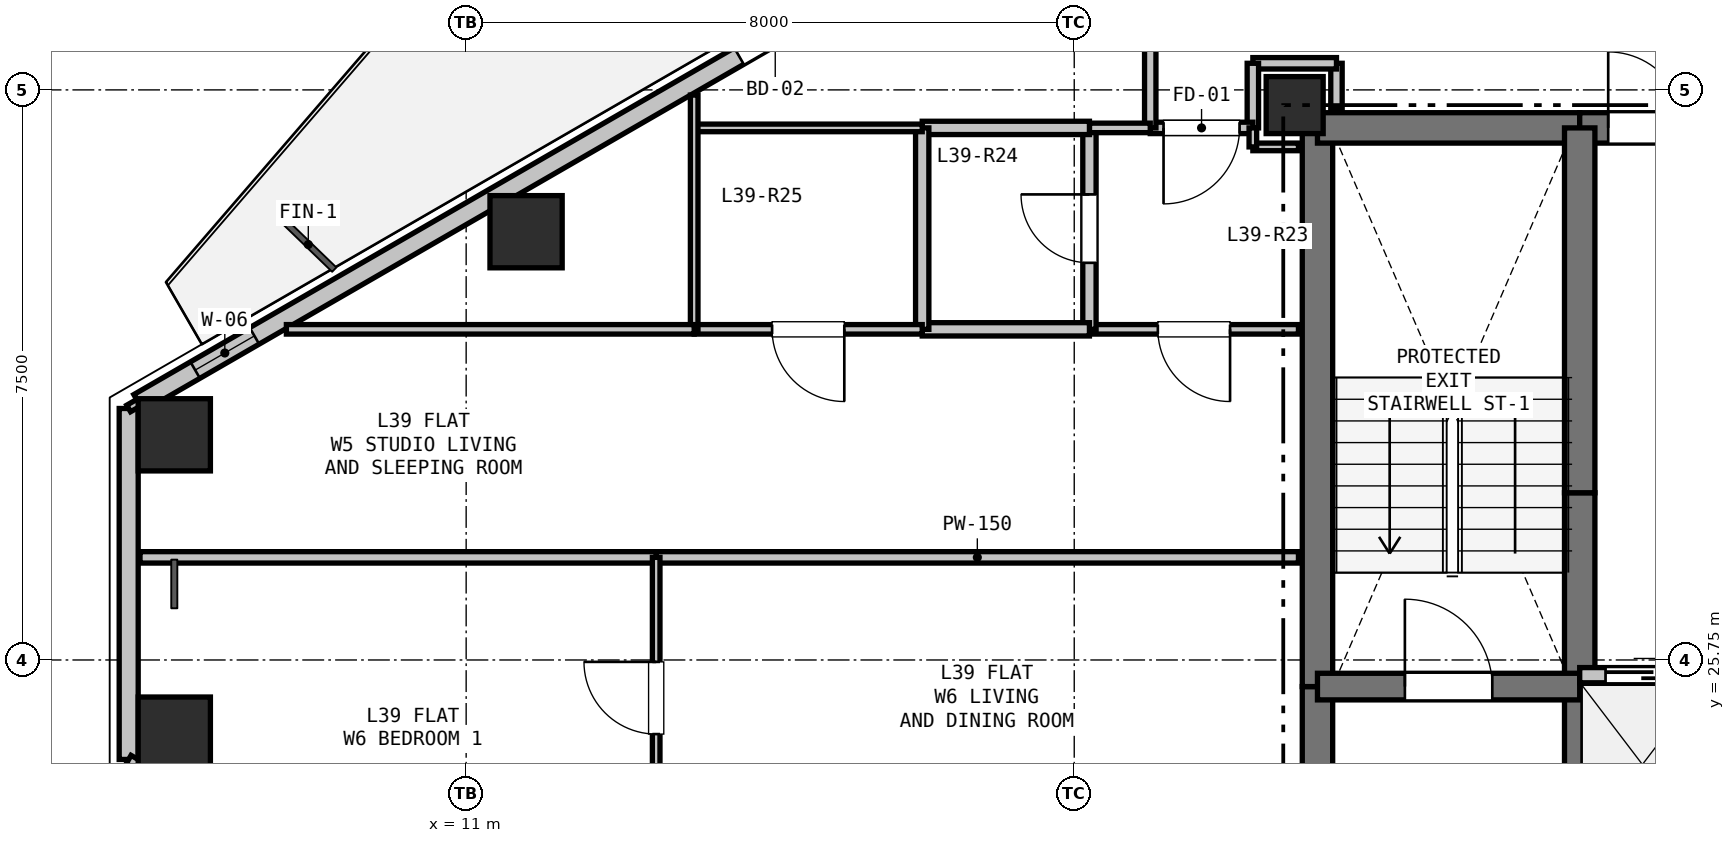
"""IFC4 building model, lengths in metres.
Left out: names, types, materials, properties, quantities, classifications, styles, units other than length and angle.
Written with IfcOpenShell. Run it as: python <this file> out.ifc"""

import sys

from ifc_helpers import new_model, si_unit, direction, frame, frame_2d, origin, origin_2d, place, context, subcontext, project, spatial, rectangle, hollow_rectangle, extrude, element, fill, save


model = new_model("IFC4")
c1 = context("Model", 3, precision=1e-05, world=origin(), true_north=direction((0.0, 1.0)))
c2 = subcontext(c1, "Body", "Model", "MODEL_VIEW")
j1 = project(units=[si_unit("LENGTHUNIT", "METRE"), si_unit("PLANEANGLEUNIT", "RADIAN")], contexts=[c1])
p1 = place(None, origin())
s1 = spatial("IfcSite", under=j1, at=p1, CompositionType="ELEMENT")
p2 = place(p1, origin())
s2 = spatial("IfcBuilding", under=s1, at=p2, CompositionType="ELEMENT")
p3 = place(p2, frame((0.0, 0.0, 141.0)))
s3 = spatial("IfcBuildingStorey", under=s2, at=p3, CompositionType="ELEMENT", Elevation=141.0)
p4 = place(p3, frame((21.9, 33.05, 0.0), z_axis=(0.0, 0.0, 1.0), x_axis=(1.0, 0.0, 0.0)))
e1 = element("IfcColumn", 1, at=p4, inside=s3, PredefinedType="COLUMN", context=c2, shape_type="SweptSolid", body=[
    extrude(rectangle(XDim=0.75, YDim=0.75, at=origin_2d()), origin(), (0.0, 0.0, 1.0), 3.3),
])
for number, where, z_axis, x_axis in (
    (2, (7.16, 28.712, 0.0), (0.0, 0.0, 1.0), (1.0, 0.0, 0.0)),
    (3, (11.788, 31.384, 0.0), (0.0, 0.0, 1.0), (1.0, 0.0, 0.0)),
    (4, (7.16, 24.788, 0.0), (0.0, 0.0, 1.0), (1.0, 0.0, 0.0)),
):
    element("IfcColumn", number, at=place(p3, frame(where, z_axis=z_axis, x_axis=x_axis)), inside=s3, PredefinedType="COLUMN", context=c2, shape_type="SweptSolid", body=[
        extrude(hollow_rectangle(XDim=0.95, YDim=0.95, WallThickness=0.028, at=origin_2d()), origin(), (0.0, 0.0, 1.0), 3.3),
    ])
p5 = place(p3, frame((6.56, 24.441, 0.0), z_axis=(0.0, 0.0, 1.0), x_axis=(0.0, 1.0, 0.0)))
e5 = element("IfcWall", 5, at=p5, inside=s3, PredefinedType="SOLIDWALL", context=c2, shape_type="SweptSolid", body=[
    extrude(rectangle(XDim=4.617, YDim=0.25, at=frame_2d((2.309, 0.0))), origin(), (0.0, 0.0, 1.0), 2.68),
])
p6 = place(p3, frame((6.69, 29.134, 0.0), z_axis=(0.0, 0.0, 1.0), x_axis=(0.866027848477, 0.499995765644, 0.0)))
e6 = element("IfcWall", 6, at=p6, inside=s3, PredefinedType="SOLIDWALL", context=c2, shape_type="SweptSolid", body=[
    extrude(rectangle(XDim=11.186, YDim=0.25, at=frame_2d((5.593, 0.0))), origin(), (0.0, 0.0, 1.0), 2.68),
])
p7 = place(p6, frame((9.122, 0.0, 0.0)))
e7 = element("IfcOpeningElement", 7, at=p7, cuts=e6, PredefinedType="OPENING", context=c2, shape_type="SweptSolid", body=[
    extrude(rectangle(XDim=1.1, YDim=2.1, at=frame_2d((0.55, 1.05))), frame((0.0, 0.135, 0.0), z_axis=(0.0, -1.0, 0.0), x_axis=(1.0, 0.0, 0.0)), (0.0, 0.0, 1.0), 0.27),
])
p8 = place(p6, frame((0.86, 0.0, 0.9)))
e8 = element("IfcOpeningElement", 8, at=p8, cuts=e6, PredefinedType="OPENING", context=c2, shape_type="SweptSolid", body=[
    extrude(rectangle(XDim=0.9, YDim=1.4, at=frame_2d((0.45, 0.7))), frame((0.0, 0.135, 0.0), z_axis=(0.0, -1.0, 0.0), x_axis=(1.0, 0.0, 0.0)), (0.0, 0.0, 1.0), 0.27),
])
p9 = place(p3, frame((16.378, 18.773, 0.0), z_axis=(0.0, 0.0, 1.0), x_axis=(-0.866027848477, 0.499995765644, 0.0)))
e9 = element("IfcWall", 9, at=p9, inside=s3, PredefinedType="SOLIDWALL", context=c2, shape_type="SweptSolid", body=[
    extrude(rectangle(XDim=11.186, YDim=0.25, at=frame_2d((5.593, 0.0))), origin(), (0.0, 0.0, 1.0), 2.68),
])
p10 = place(p9, frame((6.757, 0.0, 0.9)))
e10 = element("IfcOpeningElement", 10, at=p10, cuts=e9, PredefinedType="OPENING", context=c2, shape_type="SweptSolid", body=[
    extrude(rectangle(XDim=1.2, YDim=1.4, at=frame_2d((0.6, 0.7))), frame((0.0, 0.135, 0.0), z_axis=(0.0, -1.0, 0.0), x_axis=(1.0, 0.0, 0.0)), (0.0, 0.0, 1.0), 0.27),
])
p11 = place(p3, frame((22.2, 20.75, 0.0), z_axis=(0.0, 0.0, 1.0), x_axis=(0.0, 1.0, 0.0)))
e11 = element("IfcWall", 11, at=p11, inside=s3, PredefinedType="SHEAR", context=c2, shape_type="SweptSolid", body=[
    extrude(rectangle(XDim=4.65, YDim=0.4, at=frame_2d((2.325, 0.0))), origin(), (0.0, 0.0, 1.0), 3.06),
])
p12 = place(p3, frame((22.2, 25.4, 0.0), z_axis=(0.0, 0.0, 1.0), x_axis=(0.0, 1.0, 0.0)))
e12 = element("IfcWall", 12, at=p12, inside=s3, PredefinedType="SHEAR", context=c2, shape_type="SweptSolid", body=[
    extrude(rectangle(XDim=7.35, YDim=0.4, at=frame_2d((3.675, 0.0))), origin(), (0.0, 0.0, 1.0), 3.06),
])
p13 = place(p3, frame((22.2, 32.75, 0.0), z_axis=(0.0, 0.0, 1.0), x_axis=(1.0, 0.0, 0.0)))
e13 = element("IfcWall", 13, at=p13, inside=s3, PredefinedType="SHEAR", context=c2, shape_type="SweptSolid", body=[
    extrude(rectangle(XDim=3.45, YDim=0.4, at=frame_2d((1.725, 0.0))), origin(), (0.0, 0.0, 1.0), 3.06),
])
p14 = place(p3, frame((25.65, 32.75, 0.0), z_axis=(0.0, 0.0, 1.0), x_axis=(1.0, 0.0, 0.0)))
e14 = element("IfcWall", 14, at=p14, inside=s3, PredefinedType="SHEAR", context=c2, shape_type="SweptSolid", body=[
    extrude(rectangle(XDim=1.75, YDim=0.4, at=frame_2d((0.875, 0.0))), origin(), (0.0, 0.0, 1.0), 3.06),
])
p15 = place(p14, frame((0.375, 0.0, 0.0)))
e15 = element("IfcOpeningElement", 15, at=p15, cuts=e14, PredefinedType="OPENING", context=c2, shape_type="SweptSolid", body=[
    extrude(rectangle(XDim=1.0, YDim=2.15, at=frame_2d((0.5, 1.075))), frame((0.0, 0.21, 0.0), z_axis=(0.0, -1.0, 0.0), x_axis=(1.0, 0.0, 0.0)), (0.0, 0.0, 1.0), 0.42),
])
p16 = place(p3, frame((25.65, 22.75, 0.0), z_axis=(0.0, 0.0, 1.0), x_axis=(0.0, 1.0, 0.0)))
e16 = element("IfcWall", 16, at=p16, inside=s3, PredefinedType="SHEAR", context=c2, shape_type="SweptSolid", body=[
    extrude(rectangle(XDim=2.8, YDim=0.4, at=frame_2d((1.4, 0.0))), origin(), (0.0, 0.0, 1.0), 3.06),
])
p17 = place(p3, frame((25.65, 25.55, 0.0), z_axis=(0.0, 0.0, 1.0), x_axis=(0.0, 1.0, 0.0)))
e17 = element("IfcWall", 17, at=p17, inside=s3, PredefinedType="SHEAR", context=c2, shape_type="SweptSolid", body=[
    extrude(rectangle(XDim=2.4, YDim=0.4, at=frame_2d((1.2, 0.0))), origin(), (0.0, 0.0, 1.0), 3.06),
])
p18 = place(p3, frame((25.65, 27.95, 0.0), z_axis=(0.0, 0.0, 1.0), x_axis=(0.0, 1.0, 0.0)))
e18 = element("IfcWall", 18, at=p18, inside=s3, PredefinedType="SHEAR", context=c2, shape_type="SweptSolid", body=[
    extrude(rectangle(XDim=4.8, YDim=0.4, at=frame_2d((2.4, 0.0))), origin(), (0.0, 0.0, 1.0), 3.06),
])
p19 = place(p3, frame((22.2, 25.4, 0.0), z_axis=(0.0, 0.0, 1.0), x_axis=(1.0, 0.0, 0.0)))
e19 = element("IfcWall", 19, at=p19, inside=s3, PredefinedType="SHEAR", context=c2, shape_type="SweptSolid", body=[
    extrude(rectangle(XDim=3.45, YDim=0.35, at=frame_2d((1.725, 0.0))), origin(), (0.0, 0.0, 1.0), 3.06),
])
p20 = place(p19, frame((1.15, 0.0, 0.0)))
e20 = element("IfcOpeningElement", 20, at=p20, cuts=e19, PredefinedType="OPENING", context=c2, shape_type="SweptSolid", body=[
    extrude(rectangle(XDim=1.15, YDim=2.15, at=frame_2d((0.575, 1.075))), frame((0.0, 0.185, 0.0), z_axis=(0.0, -1.0, 0.0), x_axis=(1.0, 0.0, 0.0)), (0.0, 0.0, 1.0), 0.37),
])
p21 = place(p3, frame((25.65, 25.55, 0.0), z_axis=(0.0, 0.0, 1.0), x_axis=(1.0, 0.0, 0.0)))
e21 = element("IfcWall", 21, at=p21, inside=s3, PredefinedType="PARTITIONING", context=c2, shape_type="SweptSolid", body=[
    extrude(rectangle(XDim=4.95, YDim=0.2, at=frame_2d((2.475, 0.0))), origin(), (0.0, 0.0, 1.0), 3.06),
])
p22 = place(p21, frame((0.34, 0.0, 0.0)))
e22 = element("IfcOpeningElement", 22, at=p22, cuts=e21, PredefinedType="OPENING", context=c2, shape_type="SweptSolid", body=[
    extrude(rectangle(XDim=1.1, YDim=2.15, at=frame_2d((0.55, 1.075))), frame((0.0, 0.11, 0.0), z_axis=(0.0, -1.0, 0.0), x_axis=(1.0, 0.0, 0.0)), (0.0, 0.0, 1.0), 0.22),
])
p23 = place(p21, frame((1.99, 0.0, 0.0)))
e23 = element("IfcOpeningElement", 23, at=p23, cuts=e21, PredefinedType="OPENING", context=c2, shape_type="SweptSolid", body=[
    extrude(rectangle(XDim=1.1, YDim=2.15, at=frame_2d((0.55, 1.075))), frame((0.0, 0.11, 0.0), z_axis=(0.0, -1.0, 0.0), x_axis=(1.0, 0.0, 0.0)), (0.0, 0.0, 1.0), 0.22),
])
p24 = place(p21, frame((3.64, 0.0, 0.0)))
e24 = element("IfcOpeningElement", 24, at=p24, cuts=e21, PredefinedType="OPENING", context=c2, shape_type="SweptSolid", body=[
    extrude(rectangle(XDim=1.1, YDim=2.15, at=frame_2d((0.55, 1.075))), frame((0.0, 0.11, 0.0), z_axis=(0.0, -1.0, 0.0), x_axis=(1.0, 0.0, 0.0)), (0.0, 0.0, 1.0), 0.22),
])
p25 = place(p3, frame((22.45, 33.0, 0.0), z_axis=(0.0, 0.0, 1.0), x_axis=(0.0, 1.0, 0.0)))
e25 = element("IfcWall", 25, at=p25, inside=s3, PredefinedType="PARTITIONING", context=c2, shape_type="SweptSolid", body=[
    extrude(rectangle(XDim=0.6, YDim=0.15, at=frame_2d((0.3, 0.0))), origin(), (0.0, 0.0, 1.0), 2.585),
])
p26 = place(p3, frame((22.45, 33.6, 0.0), z_axis=(0.0, 0.0, 1.0), x_axis=(-1.0, 0.0, 0.0)))
e26 = element("IfcWall", 26, at=p26, inside=s3, PredefinedType="PARTITIONING", context=c2, shape_type="SweptSolid", body=[
    extrude(rectangle(XDim=1.1, YDim=0.15, at=frame_2d((0.55, 0.0))), origin(), (0.0, 0.0, 1.0), 3.06),
])
p27 = place(p3, frame((21.35, 33.6, 0.0), z_axis=(0.0, 0.0, 1.0), x_axis=(0.0, -1.0, 0.0)))
e27 = element("IfcWall", 27, at=p27, inside=s3, PredefinedType="PARTITIONING", context=c2, shape_type="SweptSolid", body=[
    extrude(rectangle(XDim=0.85, YDim=0.15, at=frame_2d((0.425, 0.0))), origin(), (0.0, 0.0, 1.0), 2.433),
])
p28 = place(p3, frame((21.35, 32.75, 0.0), z_axis=(0.0, 0.0, 1.0), x_axis=(-1.0, 0.0, 0.0)))
e28 = element("IfcWall", 28, at=p28, inside=s3, PredefinedType="PARTITIONING", context=c2, shape_type="SweptSolid", body=[
    extrude(rectangle(XDim=1.35, YDim=0.15, at=frame_2d((0.675, 0.0))), origin(), (0.0, 0.0, 1.0), 2.433),
])
p29 = place(p28, frame((0.175, 0.0, 0.0)))
e29 = element("IfcOpeningElement", 29, at=p29, cuts=e28, PredefinedType="OPENING", context=c2, shape_type="SweptSolid", body=[
    extrude(rectangle(XDim=1.0, YDim=2.15, at=frame_2d((0.5, 1.075))), frame((0.0, 0.085, 0.0), z_axis=(0.0, -1.0, 0.0), x_axis=(1.0, 0.0, 0.0)), (0.0, 0.0, 1.0), 0.17),
])
p30 = place(p3, frame((20.0, 32.75, 0.0), z_axis=(0.0, 0.0, 1.0), x_axis=(0.0, 1.0, 0.0)))
e30 = element("IfcWall", 30, at=p30, inside=s3, PredefinedType="PARTITIONING", context=c2, shape_type="SweptSolid", body=[
    extrude(rectangle(XDim=2.6, YDim=0.15, at=frame_2d((1.3, 0.0))), origin(), (0.0, 0.0, 1.0), 2.433),
])
p31 = place(p3, frame((21.35, 32.5, 0.0), z_axis=(0.0, 0.0, 1.0), x_axis=(1.0, 0.0, 0.0)))
e31 = element("IfcWall", 31, at=p31, inside=s3, PredefinedType="PARTITIONING", context=c2, shape_type="SweptSolid", body=[
    extrude(rectangle(XDim=0.6, YDim=0.1, at=frame_2d((0.3, 0.0))), origin(), (0.0, 0.0, 1.0), 2.585),
])
p32 = place(p3, frame((21.95, 30.1, 0.0), z_axis=(0.0, 0.0, 1.0), x_axis=(-1.0, 0.0, 0.0)))
e32 = element("IfcWall", 32, at=p32, inside=s3, PredefinedType="PARTITIONING", context=c2, shape_type="SweptSolid", body=[
    extrude(rectangle(XDim=2.75, YDim=0.125, at=frame_2d((1.375, 0.0))), origin(), (0.0, 0.0, 1.0), 2.585),
])
p33 = place(p32, frame((0.9, 0.0, 0.0)))
e33 = element("IfcOpeningElement", 33, at=p33, cuts=e32, PredefinedType="OPENING", context=c2, shape_type="SweptSolid", body=[
    extrude(rectangle(XDim=0.95, YDim=2.1, at=frame_2d((0.475, 1.05))), frame((0.0, 0.073, 0.0), z_axis=(0.0, -1.0, 0.0), x_axis=(1.0, 0.0, 0.0)), (0.0, 0.0, 1.0), 0.145),
])
p34 = place(p3, frame((19.2, 30.1, 0.0), z_axis=(0.0, 0.0, 1.0), x_axis=(0.0, 1.0, 0.0)))
e34 = element("IfcWall", 34, at=p34, inside=s3, PredefinedType="PLUMBINGWALL", context=c2, shape_type="SweptSolid", body=[
    extrude(rectangle(XDim=2.65, YDim=0.175, at=frame_2d((1.325, 0.0))), origin(), (0.0, 0.0, 1.0), 2.433),
])
p35 = place(p34, frame((0.875, 0.0, 0.0)))
e35 = element("IfcOpeningElement", 35, at=p35, cuts=e34, PredefinedType="OPENING", context=c2, shape_type="SweptSolid", body=[
    extrude(rectangle(XDim=0.9, YDim=2.1, at=frame_2d((0.45, 1.05))), frame((0.0, 0.097, 0.0), z_axis=(0.0, -1.0, 0.0), x_axis=(1.0, 0.0, 0.0)), (0.0, 0.0, 1.0), 0.195),
])
p36 = place(p3, frame((19.2, 32.75, 0.0), z_axis=(0.0, 0.0, 1.0), x_axis=(1.0, 0.0, 0.0)))
e36 = element("IfcWall", 36, at=p36, inside=s3, PredefinedType="PARTITIONING", context=c2, shape_type="SweptSolid", body=[
    extrude(rectangle(XDim=0.8, YDim=0.125, at=frame_2d((0.4, 0.0))), origin(), (0.0, 0.0, 1.0), 2.433),
])
p37 = place(p3, frame((21.35, 32.75, 0.0), z_axis=(0.0, 0.0, 1.0), x_axis=(0.0, -1.0, 0.0)))
e37 = element("IfcWall", 37, at=p37, inside=s3, PredefinedType="PARTITIONING", context=c2, shape_type="SweptSolid", body=[
    extrude(rectangle(XDim=0.25, YDim=0.1, at=frame_2d((0.125, 0.0))), origin(), (0.0, 0.0, 1.0), 3.06),
])
p38 = place(p3, frame((17.0, 32.75, 0.0), z_axis=(0.0, 0.0, 1.0), x_axis=(1.0, 0.0, 0.0)))
e38 = element("IfcWall", 38, at=p38, inside=s3, PredefinedType="PLUMBINGWALL", context=c2, shape_type="SweptSolid", body=[
    extrude(rectangle(XDim=2.2, YDim=0.175, at=frame_2d((1.1, 0.0))), origin(), (0.0, 0.0, 1.0), 2.433),
])
p39 = place(p3, frame((19.2, 30.1, 0.0), z_axis=(0.0, 0.0, 1.0), x_axis=(-1.0, 0.0, 0.0)))
e39 = element("IfcWall", 39, at=p39, inside=s3, PredefinedType="PLUMBINGWALL", context=c2, shape_type="SweptSolid", body=[
    extrude(rectangle(XDim=2.2, YDim=0.175, at=frame_2d((1.1, 0.0))), origin(), (0.0, 0.0, 1.0), 3.06),
])
p40 = place(p3, frame((17.0, 30.1, 0.0), z_axis=(0.0, 0.0, 1.0), x_axis=(0.0, 1.0, 0.0)))
e40 = element("IfcWall", 40, at=p40, inside=s3, PredefinedType="PLUMBINGWALL", context=c2, shape_type="SweptSolid", body=[
    extrude(rectangle(XDim=2.65, YDim=0.175, at=frame_2d((1.325, 0.0))), origin(), (0.0, 0.0, 1.0), 2.433),
])
p41 = place(p3, frame((14.0, 32.75, 0.0), z_axis=(0.0, 0.0, 1.0), x_axis=(1.0, 0.0, 0.0)))
e41 = element("IfcWall", 41, at=p41, inside=s3, PredefinedType="PARTITIONING", context=c2, shape_type="SweptSolid", body=[
    extrude(rectangle(XDim=3.0, YDim=0.1, at=frame_2d((1.5, 0.0))), origin(), (0.0, 0.0, 1.0), 2.365),
])
p42 = place(p3, frame((17.0, 30.1, 0.0), z_axis=(0.0, 0.0, 1.0), x_axis=(-1.0, 0.0, 0.0)))
e42 = element("IfcWall", 42, at=p42, inside=s3, PredefinedType="PARTITIONING", context=c2, shape_type="SweptSolid", body=[
    extrude(rectangle(XDim=3.0, YDim=0.125, at=frame_2d((1.5, 0.0))), origin(), (0.0, 0.0, 1.0), 3.06),
])
p43 = place(p42, frame((1.025, 0.0, 0.0)))
e43 = element("IfcOpeningElement", 43, at=p43, cuts=e42, PredefinedType="OPENING", context=c2, shape_type="SweptSolid", body=[
    extrude(rectangle(XDim=0.95, YDim=2.1, at=frame_2d((0.475, 1.05))), frame((0.0, 0.073, 0.0), z_axis=(0.0, -1.0, 0.0), x_axis=(1.0, 0.0, 0.0)), (0.0, 0.0, 1.0), 0.145),
])
p44 = place(p3, frame((14.0, 30.1, 0.0), z_axis=(0.0, 0.0, 1.0), x_axis=(0.0, 1.0, 0.0)))
e44 = element("IfcWall", 44, at=p44, inside=s3, PredefinedType="PARTITIONING", context=c2, shape_type="SweptSolid", body=[
    extrude(rectangle(XDim=3.082, YDim=0.1, at=frame_2d((1.541, 0.0))), origin(), (0.0, 0.0, 1.0), 2.365),
])
p45 = place(p3, frame((8.635, 30.1, 0.0), z_axis=(0.0, 0.0, 1.0), x_axis=(1.0, 0.0, 0.0)))
e45 = element("IfcWall", 45, at=p45, inside=s3, PredefinedType="PARTITIONING", context=c2, shape_type="SweptSolid", body=[
    extrude(rectangle(XDim=5.365, YDim=0.125, at=frame_2d((2.683, 0.0))), origin(), (0.0, 0.0, 1.0), 2.725),
])
p46 = place(p3, frame((21.95, 27.1, 0.0), z_axis=(0.0, 0.0, 1.0), x_axis=(-1.0, 0.0, 0.0)))
e46 = element("IfcWall", 46, at=p46, inside=s3, PredefinedType="PARTITIONING", context=c2, shape_type="SweptSolid", body=[
    extrude(rectangle(XDim=8.45, YDim=0.15, at=frame_2d((4.225, 0.0))), origin(), (0.0, 0.0, 1.0), 2.585),
])
p47 = place(p3, frame((13.5, 27.1, 0.0), z_axis=(0.0, 0.0, 1.0), x_axis=(-1.0, 0.0, 0.0)))
e47 = element("IfcWall", 47, at=p47, inside=s3, PredefinedType="PARTITIONING", context=c2, shape_type="SweptSolid", body=[
    extrude(rectangle(XDim=6.791, YDim=0.15, at=frame_2d((3.396, 0.0))), origin(), (0.0, 0.0, 1.0), 2.725),
])
p48 = place(p3, frame((6.56, 29.059, 0.0), z_axis=(0.0, 0.0, 1.0), x_axis=(0.866131372301, 0.499816412211, 0.0)))
e48 = element("IfcWall", 48, at=p48, inside=s3, PredefinedType="PARTITIONING", context=c2, shape_type="SweptSolid", body=[
    extrude(rectangle(XDim=0.15, YDim=0.1, at=frame_2d((0.075, 0.0))), origin(), (0.0, 0.0, 1.0), 3.06),
])
p49 = place(p3, frame((13.5, 23.4, 0.0), z_axis=(0.0, 0.0, 1.0), x_axis=(0.0, 1.0, 0.0)))
e49 = element("IfcWall", 49, at=p49, inside=s3, PredefinedType="PARTITIONING", context=c2, shape_type="SweptSolid", body=[
    extrude(rectangle(XDim=3.7, YDim=0.1, at=frame_2d((1.85, 0.0))), origin(), (0.0, 0.0, 1.0), 3.06),
])
p50 = place(p49, frame((1.375, 0.0, 0.0)))
e50 = element("IfcOpeningElement", 50, at=p50, cuts=e49, PredefinedType="OPENING", context=c2, shape_type="SweptSolid", body=[
    extrude(rectangle(XDim=0.95, YDim=2.1, at=frame_2d((0.475, 1.05))), frame((0.0, 0.06, 0.0), z_axis=(0.0, -1.0, 0.0), x_axis=(1.0, 0.0, 0.0)), (0.0, 0.0, 1.0), 0.12),
])
p51 = place(p3, frame((6.69, 24.366, 0.0), z_axis=(0.0, 0.0, 1.0), x_axis=(-0.866131372301, 0.499816412211, 0.0)))
e51 = element("IfcWall", 51, at=p51, inside=s3, PredefinedType="PARTITIONING", context=c2, shape_type="SweptSolid", body=[
    extrude(rectangle(XDim=0.15, YDim=0.125, at=frame_2d((0.075, 0.0))), origin(), (0.0, 0.0, 1.0), 3.06),
])
p52 = place(p7, origin())
e52 = element("IfcDoor", 52, at=p52, inside=s3, OperationType="SINGLE_SWING_RIGHT", PredefinedType="DOOR", context=c2, shape_type="SweptSolid", body=[
    extrude(rectangle(XDim=1.1, YDim=2.1, at=frame_2d((0.55, 1.05))), frame((0.0, 0.025, 0.0), z_axis=(0.0, -1.0, 0.0), x_axis=(1.0, 0.0, 0.0)), (0.0, 0.0, 1.0), 0.05),
])
fill(e7, e52)
p53 = place(p8, origin())
e53 = element("IfcWindow", 53, at=p53, inside=s3, PartitioningType="SINGLE_PANEL", PredefinedType="WINDOW", context=c2, shape_type="SweptSolid", body=[
    extrude(rectangle(XDim=0.9, YDim=1.4, at=frame_2d((0.45, 0.7))), frame((0.0, 0.03, 0.0), z_axis=(0.0, -1.0, 0.0), x_axis=(1.0, 0.0, 0.0)), (0.0, 0.0, 1.0), 0.06),
])
fill(e8, e53)
p54 = place(p22, origin())
e54 = element("IfcDoor", 54, at=p54, inside=s3, OperationType="SLIDING_TO_LEFT", PredefinedType="DOOR", context=c2, shape_type="SweptSolid", body=[
    extrude(rectangle(XDim=1.1, YDim=2.15, at=frame_2d((0.55, 1.075))), frame((0.0, 0.025, 0.0), z_axis=(0.0, -1.0, 0.0), x_axis=(1.0, 0.0, 0.0)), (0.0, 0.0, 1.0), 0.05),
])
fill(e22, e54)
p55 = place(p15, origin())
e55 = element("IfcDoor", 55, at=p55, inside=s3, OperationType="SINGLE_SWING_LEFT", PredefinedType="DOOR", context=c2, shape_type="SweptSolid", body=[
    extrude(rectangle(XDim=1.0, YDim=2.15, at=frame_2d((0.5, 1.075))), frame((0.0, 0.025, 0.0), z_axis=(0.0, -1.0, 0.0), x_axis=(1.0, 0.0, 0.0)), (0.0, 0.0, 1.0), 0.05),
])
fill(e15, e55)
p56 = place(p20, origin())
e56 = element("IfcDoor", 56, at=p56, inside=s3, OperationType="SINGLE_SWING_LEFT", PredefinedType="DOOR", context=c2, shape_type="SweptSolid", body=[
    extrude(rectangle(XDim=1.15, YDim=2.15, at=frame_2d((0.575, 1.075))), frame((0.0, 0.025, 0.0), z_axis=(0.0, -1.0, 0.0), x_axis=(1.0, 0.0, 0.0)), (0.0, 0.0, 1.0), 0.05),
])
fill(e20, e56)
p57 = place(p29, origin())
e57 = element("IfcDoor", 57, at=p57, inside=s3, OperationType="SINGLE_SWING_RIGHT", PredefinedType="DOOR", context=c2, shape_type="SweptSolid", body=[
    extrude(rectangle(XDim=1.0, YDim=2.15, at=frame_2d((0.5, 1.075))), frame((0.0, 0.025, 0.0), z_axis=(0.0, -1.0, 0.0), x_axis=(1.0, 0.0, 0.0)), (0.0, 0.0, 1.0), 0.05),
])
fill(e29, e57)
p58 = place(p35, origin())
e58 = element("IfcDoor", 58, at=p58, inside=s3, OperationType="SINGLE_SWING_RIGHT", PredefinedType="DOOR", context=c2, shape_type="SweptSolid", body=[
    extrude(rectangle(XDim=0.9, YDim=2.1, at=frame_2d((0.45, 1.05))), frame((0.0, 0.025, 0.0), z_axis=(0.0, -1.0, 0.0), x_axis=(1.0, 0.0, 0.0)), (0.0, 0.0, 1.0), 0.05),
])
fill(e35, e58)
p59 = place(p33, origin())
e59 = element("IfcDoor", 59, at=p59, inside=s3, OperationType="SINGLE_SWING_LEFT", PredefinedType="DOOR", context=c2, shape_type="SweptSolid", body=[
    extrude(rectangle(XDim=0.95, YDim=2.1, at=frame_2d((0.475, 1.05))), frame((0.0, 0.025, 0.0), z_axis=(0.0, -1.0, 0.0), x_axis=(1.0, 0.0, 0.0)), (0.0, 0.0, 1.0), 0.05),
])
fill(e33, e59)
p60 = place(p43, origin())
e60 = element("IfcDoor", 60, at=p60, inside=s3, OperationType="SINGLE_SWING_LEFT", PredefinedType="DOOR", context=c2, shape_type="SweptSolid", body=[
    extrude(rectangle(XDim=0.95, YDim=2.1, at=frame_2d((0.475, 1.05))), frame((0.0, 0.025, 0.0), z_axis=(0.0, -1.0, 0.0), x_axis=(1.0, 0.0, 0.0)), (0.0, 0.0, 1.0), 0.05),
])
fill(e43, e60)
p61 = place(p50, origin())
e61 = element("IfcDoor", 61, at=p61, inside=s3, OperationType="SINGLE_SWING_RIGHT", PredefinedType="DOOR", context=c2, shape_type="SweptSolid", body=[
    extrude(rectangle(XDim=0.95, YDim=2.1, at=frame_2d((0.475, 1.05))), frame((0.0, 0.025, 0.0), z_axis=(0.0, -1.0, 0.0), x_axis=(1.0, 0.0, 0.0)), (0.0, 0.0, 1.0), 0.05),
])
fill(e50, e61)
save(model, sys.argv[1])
